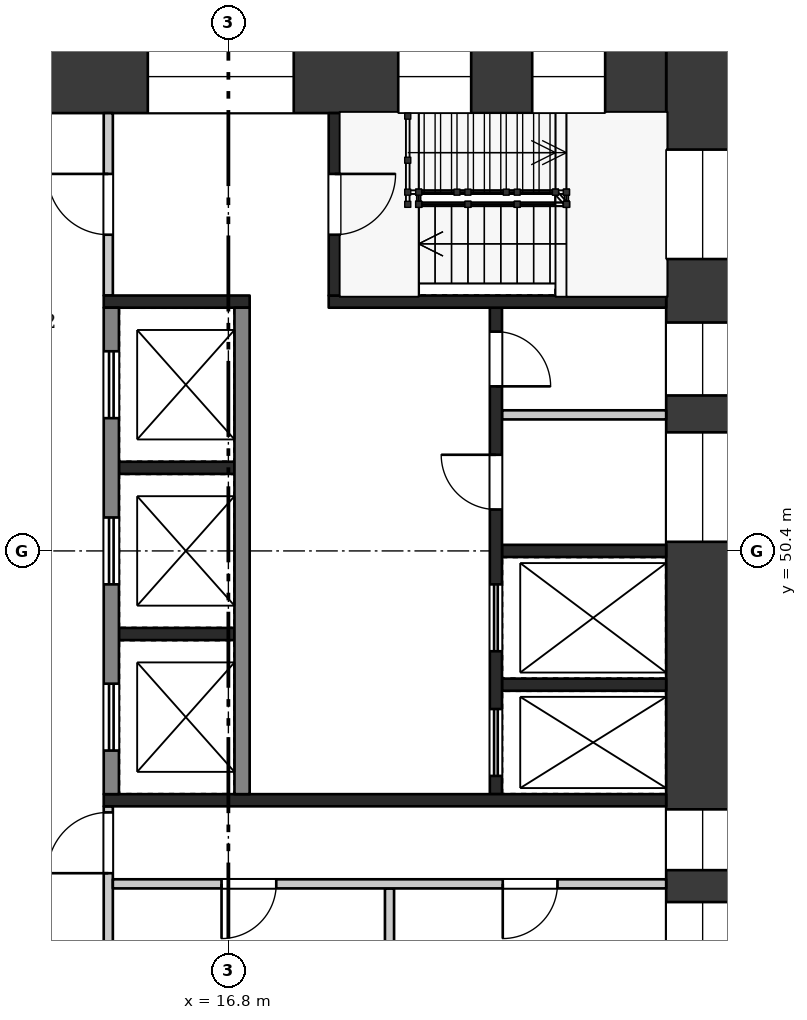
"""IFC4 building model, lengths in metres.
Left out: names, types, materials, properties, quantities, classifications, styles, units other than length and angle.
Written with IfcOpenShell. Run it as: python <this file> out.ifc"""

import sys

from ifc_helpers import new_model, si_unit, direction, frame, frame_2d, origin, origin_2d, place, context, subcontext, project, spatial, rectangle, extrude, element, fill, save


model = new_model("IFC4")
c1 = context("Model", 3, precision=1e-05, world=origin(), true_north=direction((0.0, 1.0)))
c2 = subcontext(c1, "Body", "Model", "MODEL_VIEW")
j1 = project(units=[si_unit("LENGTHUNIT", "METRE"), si_unit("PLANEANGLEUNIT", "RADIAN")], contexts=[c1])
p1 = place(None, origin())
s1 = spatial("IfcSite", under=j1, at=p1, CompositionType="ELEMENT")
p2 = place(p1, origin())
s2 = spatial("IfcBuilding", under=s1, at=p2, CompositionType="ELEMENT")
p3 = place(p2, frame((0.0, 0.0, 277.2)))
s3 = spatial("IfcBuildingStorey", under=s2, at=p3, CompositionType="ELEMENT", Elevation=277.2)
p4 = place(p3, frame((24.6, 58.8, 0.0), z_axis=(0.0, 0.0, 1.0), x_axis=(0.0, -1.0, 0.0)))
e1 = element("IfcWall", 1, at=p4, inside=s3, PredefinedType="SHEAR", context=c2, shape_type="SweptSolid", body=[
    extrude(rectangle(XDim=16.8, YDim=1.2, at=frame_2d((8.4, 0.0))), origin(), (0.0, 0.0, 1.0), 6.58),
])
p5 = place(p4, frame((1.8, 0.0, 0.5)))
e2 = element("IfcOpeningElement", 2, at=p5, cuts=e1, PredefinedType="OPENING", context=c2, shape_type="SweptSolid", body=[
    extrude(rectangle(XDim=1.8, YDim=2.4, at=frame_2d((0.9, 1.2))), frame((0.0, 0.61, 0.0), z_axis=(0.0, -1.0, 0.0), x_axis=(1.0, 0.0, 0.0)), (0.0, 0.0, 1.0), 1.22),
])
p6 = place(p4, frame((4.644, 0.0, 1.6)))
e3 = element("IfcOpeningElement", 3, at=p6, cuts=e1, PredefinedType="OPENING", context=c2, shape_type="SweptSolid", body=[
    extrude(rectangle(XDim=1.2, YDim=1.2, at=frame_2d((0.6, 0.6))), frame((0.0, 0.61, 0.0), z_axis=(0.0, -1.0, 0.0), x_axis=(1.0, 0.0, 0.0)), (0.0, 0.0, 1.0), 1.22),
])
p7 = place(p4, frame((6.45, 0.0, 1.6)))
e4 = element("IfcOpeningElement", 4, at=p7, cuts=e1, PredefinedType="OPENING", context=c2, shape_type="SweptSolid", body=[
    extrude(rectangle(XDim=1.8, YDim=1.2, at=frame_2d((0.9, 0.6))), frame((0.0, 0.61, 0.0), z_axis=(0.0, -1.0, 0.0), x_axis=(1.0, 0.0, 0.0)), (0.0, 0.0, 1.0), 1.22),
])
p8 = place(p4, frame((12.65, 0.0, 0.6)))
e5 = element("IfcOpeningElement", 5, at=p8, cuts=e1, PredefinedType="OPENING", context=c2, shape_type="SweptSolid", body=[
    extrude(rectangle(XDim=1.0, YDim=2.1, at=frame_2d((0.5, 1.05))), frame((0.0, 0.61, 0.0), z_axis=(0.0, -1.0, 0.0), x_axis=(1.0, 0.0, 0.0)), (0.0, 0.0, 1.0), 1.22),
])
p9 = place(p4, frame((14.175, 0.0, 1.6)))
e6 = element("IfcOpeningElement", 6, at=p9, cuts=e1, PredefinedType="OPENING", context=c2, shape_type="SweptSolid", body=[
    extrude(rectangle(XDim=1.2, YDim=1.2, at=frame_2d((0.6, 0.6))), frame((0.0, 0.61, 0.0), z_axis=(0.0, -1.0, 0.0), x_axis=(1.0, 0.0, 0.0)), (0.0, 0.0, 1.0), 1.22),
])
p10 = place(p3, frame((9.6, 58.2, 0.0), z_axis=(0.0, 0.0, 1.0), x_axis=(1.0, 0.0, 0.0)))
e7 = element("IfcWall", 7, at=p10, inside=s3, PredefinedType="SHEAR", context=c2, shape_type="SweptSolid", body=[
    extrude(rectangle(XDim=14.4, YDim=1.2, at=frame_2d((7.2, 0.0))), origin(), (0.0, 0.0, 1.0), 6.58),
])
p11 = place(p10, frame((1.105, 0.0, 0.6)))
e8 = element("IfcOpeningElement", 8, at=p11, cuts=e7, PredefinedType="OPENING", context=c2, shape_type="SweptSolid", body=[
    extrude(rectangle(XDim=3.0, YDim=2.1, at=frame_2d((1.5, 1.05))), frame((0.0, 0.61, 0.0), z_axis=(0.0, -1.0, 0.0), x_axis=(1.0, 0.0, 0.0)), (0.0, 0.0, 1.0), 1.22),
])
p12 = place(p10, frame((5.875, 0.0, 0.6)))
e9 = element("IfcOpeningElement", 9, at=p12, cuts=e7, PredefinedType="OPENING", context=c2, shape_type="SweptSolid", body=[
    extrude(rectangle(XDim=2.4, YDim=2.1, at=frame_2d((1.2, 1.05))), frame((0.0, 0.61, 0.0), z_axis=(0.0, -1.0, 0.0), x_axis=(1.0, 0.0, 0.0)), (0.0, 0.0, 1.0), 1.22),
])
p13 = place(p10, frame((9.993, 0.0, 0.5)))
e10 = element("IfcOpeningElement", 10, at=p13, cuts=e7, PredefinedType="OPENING", context=c2, shape_type="SweptSolid", body=[
    extrude(rectangle(XDim=1.2, YDim=2.4, at=frame_2d((0.6, 1.2))), frame((0.0, 0.61, 0.0), z_axis=(0.0, -1.0, 0.0), x_axis=(1.0, 0.0, 0.0)), (0.0, 0.0, 1.0), 1.22),
])
p14 = place(p10, frame((12.197, 0.0, 0.5)))
e11 = element("IfcOpeningElement", 11, at=p14, cuts=e7, PredefinedType="OPENING", context=c2, shape_type="SweptSolid", body=[
    extrude(rectangle(XDim=1.2, YDim=2.4, at=frame_2d((0.6, 1.2))), frame((0.0, 0.61, 0.0), z_axis=(0.0, -1.0, 0.0), x_axis=(1.0, 0.0, 0.0)), (0.0, 0.0, 1.0), 1.22),
])
for number, where, z_axis, x_axis in (
    (12, (15.0, 51.767, 0.0), (0.0, 0.0, 1.0), (1.0, 0.0, 0.0)),
    (13, (15.0, 49.033, 0.0), (0.0, 0.0, 1.0), (1.0, 0.0, 0.0)),
):
    element("IfcWall", number, at=place(p3, frame(where, z_axis=z_axis, x_axis=x_axis)), inside=s3, PredefinedType="SHEAR", context=c2, shape_type="SweptSolid", body=[
        extrude(rectangle(XDim=1.9, YDim=0.2, at=frame_2d((0.95, 0.0))), origin(), (0.0, 0.0, 1.0), 6.58),
    ])
p15 = place(p3, frame((14.875, 54.4, 0.0), z_axis=(0.0, 0.0, 1.0), x_axis=(0.0, -1.0, 0.0)))
e14 = element("IfcWall", 14, at=p15, inside=s3, PredefinedType="SHEAR", context=c2, shape_type="SweptSolid", body=[
    extrude(rectangle(XDim=8.0, YDim=0.25, at=frame_2d((4.0, 0.0))), origin(), (0.0, 0.0, 1.0), 6.58),
])
p16 = place(p15, frame((0.717, 0.0, 0.0)))
e15 = element("IfcOpeningElement", 15, at=p16, cuts=e14, PredefinedType="OPENING", context=c2, shape_type="SweptSolid", body=[
    extrude(rectangle(XDim=1.1, YDim=2.1, at=frame_2d((0.55, 1.05))), frame((0.0, 0.135, 0.0), z_axis=(0.0, -1.0, 0.0), x_axis=(1.0, 0.0, 0.0)), (0.0, 0.0, 1.0), 0.27),
])
p17 = place(p15, frame((3.45, 0.0, 0.0)))
e16 = element("IfcOpeningElement", 16, at=p17, cuts=e14, PredefinedType="OPENING", context=c2, shape_type="SweptSolid", body=[
    extrude(rectangle(XDim=1.1, YDim=2.1, at=frame_2d((0.55, 1.05))), frame((0.0, 0.135, 0.0), z_axis=(0.0, -1.0, 0.0), x_axis=(1.0, 0.0, 0.0)), (0.0, 0.0, 1.0), 0.27),
])
p18 = place(p15, frame((6.183, 0.0, 0.0)))
e17 = element("IfcOpeningElement", 17, at=p18, cuts=e14, PredefinedType="OPENING", context=c2, shape_type="SweptSolid", body=[
    extrude(rectangle(XDim=1.1, YDim=2.1, at=frame_2d((0.55, 1.05))), frame((0.0, 0.135, 0.0), z_axis=(0.0, -1.0, 0.0), x_axis=(1.0, 0.0, 0.0)), (0.0, 0.0, 1.0), 0.27),
])
p19 = place(p3, frame((17.025, 54.4, 0.0), z_axis=(0.0, 0.0, 1.0), x_axis=(0.0, -1.0, 0.0)))
e18 = element("IfcWall", 18, at=p19, inside=s3, PredefinedType="SHEAR", context=c2, shape_type="SweptSolid", body=[
    extrude(rectangle(XDim=8.0, YDim=0.25, at=frame_2d((4.0, 0.0))), origin(), (0.0, 0.0, 1.0), 6.58),
])
for number, where, z_axis, x_axis in (
    (19, (21.3, 50.4, 0.0), (0.0, 0.0, 1.0), (1.0, 0.0, 0.0)),
    (20, (21.3, 48.2, 0.0), (0.0, 0.0, 1.0), (1.0, 0.0, 0.0)),
):
    element("IfcWall", number, at=place(p3, frame(where, z_axis=z_axis, x_axis=x_axis)), inside=s3, PredefinedType="SHEAR", context=c2, shape_type="SweptSolid", body=[
        extrude(rectangle(XDim=2.7, YDim=0.2, at=frame_2d((1.35, 0.0))), origin(), (0.0, 0.0, 1.0), 6.58),
    ])
p20 = place(p3, frame((21.3, 52.637, 0.0), z_axis=(0.0, 0.0, 1.0), x_axis=(1.0, 0.0, 0.0)))
e21 = element("IfcWall", 21, at=p20, inside=s3, PredefinedType="PARTITIONING", context=c2, shape_type="SweptSolid", body=[
    extrude(rectangle(XDim=2.7, YDim=0.15, at=frame_2d((1.35, 0.0))), origin(), (0.0, 0.0, 1.0), 6.58),
])
p21 = place(p3, frame((21.2, 54.4, 0.0), z_axis=(0.0, 0.0, 1.0), x_axis=(0.0, -1.0, 0.0)))
e22 = element("IfcWall", 22, at=p21, inside=s3, PredefinedType="SHEAR", context=c2, shape_type="SweptSolid", body=[
    extrude(rectangle(XDim=8.0, YDim=0.2, at=frame_2d((4.0, 0.0))), origin(), (0.0, 0.0, 1.0), 6.58),
])
p22 = place(p21, frame((0.394, 0.0, 0.0)))
e23 = element("IfcOpeningElement", 23, at=p22, cuts=e22, PredefinedType="OPENING", context=c2, shape_type="SweptSolid", body=[
    extrude(rectangle(XDim=0.9, YDim=2.1, at=frame_2d((0.45, 1.05))), frame((0.0, 0.11, 0.0), z_axis=(0.0, -1.0, 0.0), x_axis=(1.0, 0.0, 0.0)), (0.0, 0.0, 1.0), 0.22),
])
p23 = place(p21, frame((2.419, 0.0, 0.0)))
e24 = element("IfcOpeningElement", 24, at=p23, cuts=e22, PredefinedType="OPENING", context=c2, shape_type="SweptSolid", body=[
    extrude(rectangle(XDim=0.9, YDim=2.1, at=frame_2d((0.45, 1.05))), frame((0.0, 0.11, 0.0), z_axis=(0.0, -1.0, 0.0), x_axis=(1.0, 0.0, 0.0)), (0.0, 0.0, 1.0), 0.22),
])
p24 = place(p21, frame((4.55, 0.0, 0.0)))
e25 = element("IfcOpeningElement", 25, at=p24, cuts=e22, PredefinedType="OPENING", context=c2, shape_type="SweptSolid", body=[
    extrude(rectangle(XDim=1.1, YDim=2.1, at=frame_2d((0.55, 1.05))), frame((0.0, 0.11, 0.0), z_axis=(0.0, -1.0, 0.0), x_axis=(1.0, 0.0, 0.0)), (0.0, 0.0, 1.0), 0.22),
])
p25 = place(p21, frame((6.6, 0.0, 0.0)))
e26 = element("IfcOpeningElement", 26, at=p25, cuts=e22, PredefinedType="OPENING", context=c2, shape_type="SweptSolid", body=[
    extrude(rectangle(XDim=1.1, YDim=2.1, at=frame_2d((0.55, 1.05))), frame((0.0, 0.11, 0.0), z_axis=(0.0, -1.0, 0.0), x_axis=(1.0, 0.0, 0.0)), (0.0, 0.0, 1.0), 0.22),
])
p26 = place(p3, frame((14.75, 54.5, 0.0), z_axis=(0.0, 0.0, 1.0), x_axis=(1.0, 0.0, 0.0)))
e27 = element("IfcWall", 27, at=p26, inside=s3, PredefinedType="SHEAR", context=c2, shape_type="SweptSolid", body=[
    extrude(rectangle(XDim=2.4, YDim=0.2, at=frame_2d((1.2, 0.0))), origin(), (0.0, 0.0, 1.0), 6.58),
])
p27 = place(p3, frame((18.45, 54.5, 0.0), z_axis=(0.0, 0.0, 1.0), x_axis=(1.0, 0.0, 0.0)))
e28 = element("IfcWall", 28, at=p27, inside=s3, PredefinedType="SHEAR", context=c2, shape_type="SweptSolid", body=[
    extrude(rectangle(XDim=5.55, YDim=0.2, at=frame_2d((2.775, 0.0))), origin(), (0.0, 0.0, 1.0), 6.58),
])
p28 = place(p3, frame((14.825, 57.6, 0.0), z_axis=(0.0, 0.0, 1.0), x_axis=(0.0, -1.0, 0.0)))
e29 = element("IfcWall", 29, at=p28, inside=s3, PredefinedType="PARTITIONING", context=c2, shape_type="SweptSolid", body=[
    extrude(rectangle(XDim=3.0, YDim=0.15, at=frame_2d((1.5, 0.0))), origin(), (0.0, 0.0, 1.0), 6.58),
])
p29 = place(p28, frame((1.0, 0.0, 0.0)))
e30 = element("IfcOpeningElement", 30, at=p29, cuts=e29, PredefinedType="OPENING", context=c2, shape_type="SweptSolid", body=[
    extrude(rectangle(XDim=1.0, YDim=2.1, at=frame_2d((0.5, 1.05))), frame((0.0, 0.085, 0.0), z_axis=(0.0, -1.0, 0.0), x_axis=(1.0, 0.0, 0.0)), (0.0, 0.0, 1.0), 0.17),
])
p30 = place(p3, frame((18.55, 57.6, 0.0), z_axis=(0.0, 0.0, 1.0), x_axis=(0.0, -1.0, 0.0)))
e31 = element("IfcWall", 31, at=p30, inside=s3, PredefinedType="SHEAR", context=c2, shape_type="SweptSolid", body=[
    extrude(rectangle(XDim=3.0, YDim=0.2, at=frame_2d((1.5, 0.0))), origin(), (0.0, 0.0, 1.0), 6.58),
])
p31 = place(p30, frame((1.0, 0.0, 0.0)))
e32 = element("IfcOpeningElement", 32, at=p31, cuts=e31, PredefinedType="OPENING", context=c2, shape_type="SweptSolid", body=[
    extrude(rectangle(XDim=1.0, YDim=2.1, at=frame_2d((0.5, 1.05))), frame((0.0, 0.11, 0.0), z_axis=(0.0, -1.0, 0.0), x_axis=(1.0, 0.0, 0.0)), (0.0, 0.0, 1.0), 0.22),
])
p32 = place(p3, frame((14.75, 46.3, 0.0), z_axis=(0.0, 0.0, 1.0), x_axis=(1.0, 0.0, 0.0)))
e33 = element("IfcWall", 33, at=p32, inside=s3, PredefinedType="SHEAR", context=c2, shape_type="SweptSolid", body=[
    extrude(rectangle(XDim=9.25, YDim=0.2, at=frame_2d((4.625, 0.0))), origin(), (0.0, 0.0, 1.0), 6.58),
])
p33 = place(p3, frame((14.825, 46.2, 0.0), z_axis=(0.0, 0.0, 1.0), x_axis=(0.0, -1.0, 0.0)))
e34 = element("IfcWall", 34, at=p33, inside=s3, PredefinedType="PARTITIONING", context=c2, shape_type="SweptSolid", body=[
    extrude(rectangle(XDim=3.0, YDim=0.15, at=frame_2d((1.5, 0.0))), origin(), (0.0, 0.0, 1.0), 6.58),
])
p34 = place(p33, frame((0.1, 0.0, 0.0)))
e35 = element("IfcOpeningElement", 35, at=p34, cuts=e34, PredefinedType="OPENING", context=c2, shape_type="SweptSolid", body=[
    extrude(rectangle(XDim=1.0, YDim=2.1, at=frame_2d((0.5, 1.05))), frame((0.0, 0.085, 0.0), z_axis=(0.0, -1.0, 0.0), x_axis=(1.0, 0.0, 0.0)), (0.0, 0.0, 1.0), 0.17),
])
p35 = place(p3, frame((19.45, 44.85, 0.0), z_axis=(0.0, 0.0, 1.0), x_axis=(0.0, -1.0, 0.0)))
e36 = element("IfcWall", 36, at=p35, inside=s3, PredefinedType="PARTITIONING", context=c2, shape_type="SweptSolid", body=[
    extrude(rectangle(XDim=1.65, YDim=0.15, at=frame_2d((0.825, 0.0))), origin(), (0.0, 0.0, 1.0), 6.58),
])
p36 = place(p3, frame((14.9, 44.925, 0.0), z_axis=(0.0, 0.0, 1.0), x_axis=(1.0, 0.0, 0.0)))
e37 = element("IfcWall", 37, at=p36, inside=s3, PredefinedType="PARTITIONING", context=c2, shape_type="SweptSolid", body=[
    extrude(rectangle(XDim=9.1, YDim=0.15, at=frame_2d((4.55, 0.0))), origin(), (0.0, 0.0, 1.0), 6.58),
])
p37 = place(p36, frame((1.788, 0.0, 0.0)))
e38 = element("IfcOpeningElement", 38, at=p37, cuts=e37, PredefinedType="OPENING", context=c2, shape_type="SweptSolid", body=[
    extrude(rectangle(XDim=0.9, YDim=2.1, at=frame_2d((0.45, 1.05))), frame((0.0, 0.085, 0.0), z_axis=(0.0, -1.0, 0.0), x_axis=(1.0, 0.0, 0.0)), (0.0, 0.0, 1.0), 0.17),
])
p38 = place(p36, frame((6.413, 0.0, 0.0)))
e39 = element("IfcOpeningElement", 39, at=p38, cuts=e37, PredefinedType="OPENING", context=c2, shape_type="SweptSolid", body=[
    extrude(rectangle(XDim=0.9, YDim=2.1, at=frame_2d((0.45, 1.05))), frame((0.0, 0.085, 0.0), z_axis=(0.0, -1.0, 0.0), x_axis=(1.0, 0.0, 0.0)), (0.0, 0.0, 1.0), 0.17),
])
p39 = place(p16, origin())
e40 = element("IfcDoor", 40, at=p39, inside=s3, OperationType="DOUBLE_DOOR_SLIDING", PredefinedType="DOOR", context=c2, shape_type="SweptSolid", body=[
    extrude(rectangle(XDim=1.1, YDim=2.1, at=frame_2d((0.55, 1.05))), frame((0.0, 0.025, 0.0), z_axis=(0.0, -1.0, 0.0), x_axis=(1.0, 0.0, 0.0)), (0.0, 0.0, 1.0), 0.05),
])
fill(e15, e40)
p40 = place(p17, origin())
e41 = element("IfcDoor", 41, at=p40, inside=s3, OperationType="DOUBLE_DOOR_SLIDING", PredefinedType="DOOR", context=c2, shape_type="SweptSolid", body=[
    extrude(rectangle(XDim=1.1, YDim=2.1, at=frame_2d((0.55, 1.05))), frame((0.0, 0.025, 0.0), z_axis=(0.0, -1.0, 0.0), x_axis=(1.0, 0.0, 0.0)), (0.0, 0.0, 1.0), 0.05),
])
fill(e16, e41)
p41 = place(p18, origin())
e42 = element("IfcDoor", 42, at=p41, inside=s3, OperationType="DOUBLE_DOOR_SLIDING", PredefinedType="DOOR", context=c2, shape_type="SweptSolid", body=[
    extrude(rectangle(XDim=1.1, YDim=2.1, at=frame_2d((0.55, 1.05))), frame((0.0, 0.025, 0.0), z_axis=(0.0, -1.0, 0.0), x_axis=(1.0, 0.0, 0.0)), (0.0, 0.0, 1.0), 0.05),
])
fill(e17, e42)
p42 = place(p22, origin())
e43 = element("IfcDoor", 43, at=p42, inside=s3, OperationType="SINGLE_SWING_RIGHT", PredefinedType="DOOR", context=c2, shape_type="SweptSolid", body=[
    extrude(rectangle(XDim=0.9, YDim=2.1, at=frame_2d((0.45, 1.05))), frame((0.0, 0.025, 0.0), z_axis=(0.0, -1.0, 0.0), x_axis=(1.0, 0.0, 0.0)), (0.0, 0.0, 1.0), 0.05),
])
fill(e23, e43)
p43 = place(p23, frame((0.9, 0.0, 0.0), z_axis=(0.0, 0.0, 1.0), x_axis=(-1.0, 0.0, 0.0)))
e44 = element("IfcDoor", 44, at=p43, inside=s3, OperationType="SINGLE_SWING_RIGHT", PredefinedType="DOOR", context=c2, shape_type="SweptSolid", body=[
    extrude(rectangle(XDim=0.9, YDim=2.1, at=frame_2d((0.45, 1.05))), frame((0.0, 0.025, 0.0), z_axis=(0.0, -1.0, 0.0), x_axis=(1.0, 0.0, 0.0)), (0.0, 0.0, 1.0), 0.05),
])
fill(e24, e44)
p44 = place(p24, origin())
e45 = element("IfcDoor", 45, at=p44, inside=s3, OperationType="DOUBLE_DOOR_SLIDING", PredefinedType="DOOR", context=c2, shape_type="SweptSolid", body=[
    extrude(rectangle(XDim=1.1, YDim=2.1, at=frame_2d((0.55, 1.05))), frame((0.0, 0.025, 0.0), z_axis=(0.0, -1.0, 0.0), x_axis=(1.0, 0.0, 0.0)), (0.0, 0.0, 1.0), 0.05),
])
fill(e25, e45)
p45 = place(p25, origin())
e46 = element("IfcDoor", 46, at=p45, inside=s3, OperationType="DOUBLE_DOOR_SLIDING", PredefinedType="DOOR", context=c2, shape_type="SweptSolid", body=[
    extrude(rectangle(XDim=1.1, YDim=2.1, at=frame_2d((0.55, 1.05))), frame((0.0, 0.025, 0.0), z_axis=(0.0, -1.0, 0.0), x_axis=(1.0, 0.0, 0.0)), (0.0, 0.0, 1.0), 0.05),
])
fill(e26, e46)
p46 = place(p29, frame((1.0, 0.0, 0.0), z_axis=(0.0, 0.0, 1.0), x_axis=(-1.0, 0.0, 0.0)))
e47 = element("IfcDoor", 47, at=p46, inside=s3, OperationType="SINGLE_SWING_RIGHT", PredefinedType="DOOR", context=c2, shape_type="SweptSolid", body=[
    extrude(rectangle(XDim=1.0, YDim=2.1, at=frame_2d((0.5, 1.05))), frame((0.0, 0.025, 0.0), z_axis=(0.0, -1.0, 0.0), x_axis=(1.0, 0.0, 0.0)), (0.0, 0.0, 1.0), 0.05),
])
fill(e30, e47)
p47 = place(p31, origin())
e48 = element("IfcDoor", 48, at=p47, inside=s3, OperationType="SINGLE_SWING_LEFT", PredefinedType="DOOR", context=c2, shape_type="SweptSolid", body=[
    extrude(rectangle(XDim=1.0, YDim=2.1, at=frame_2d((0.5, 1.05))), frame((0.0, 0.025, 0.0), z_axis=(0.0, -1.0, 0.0), x_axis=(1.0, 0.0, 0.0)), (0.0, 0.0, 1.0), 0.05),
])
fill(e32, e48)
p48 = place(p34, frame((1.0, 0.0, 0.0), z_axis=(0.0, 0.0, 1.0), x_axis=(-1.0, 0.0, 0.0)))
e49 = element("IfcDoor", 49, at=p48, inside=s3, OperationType="SINGLE_SWING_LEFT", PredefinedType="DOOR", context=c2, shape_type="SweptSolid", body=[
    extrude(rectangle(XDim=1.0, YDim=2.1, at=frame_2d((0.5, 1.05))), frame((0.0, 0.025, 0.0), z_axis=(0.0, -1.0, 0.0), x_axis=(1.0, 0.0, 0.0)), (0.0, 0.0, 1.0), 0.05),
])
fill(e35, e49)
p49 = place(p37, frame((0.9, 0.0, 0.0), z_axis=(0.0, 0.0, 1.0), x_axis=(-1.0, 0.0, 0.0)))
e50 = element("IfcDoor", 50, at=p49, inside=s3, OperationType="SINGLE_SWING_RIGHT", PredefinedType="DOOR", context=c2, shape_type="SweptSolid", body=[
    extrude(rectangle(XDim=0.9, YDim=2.1, at=frame_2d((0.45, 1.05))), frame((0.0, 0.025, 0.0), z_axis=(0.0, -1.0, 0.0), x_axis=(1.0, 0.0, 0.0)), (0.0, 0.0, 1.0), 0.05),
])
fill(e38, e50)
p50 = place(p38, frame((0.9, 0.0, 0.0), z_axis=(0.0, 0.0, 1.0), x_axis=(-1.0, 0.0, 0.0)))
e51 = element("IfcDoor", 51, at=p50, inside=s3, OperationType="SINGLE_SWING_RIGHT", PredefinedType="DOOR", context=c2, shape_type="SweptSolid", body=[
    extrude(rectangle(XDim=0.9, YDim=2.1, at=frame_2d((0.45, 1.05))), frame((0.0, 0.025, 0.0), z_axis=(0.0, -1.0, 0.0), x_axis=(1.0, 0.0, 0.0)), (0.0, 0.0, 1.0), 0.05),
])
fill(e39, e51)
p51 = place(p5, origin())
e52 = element("IfcWindow", 52, at=p51, inside=s3, PartitioningType="SINGLE_PANEL", PredefinedType="WINDOW", context=c2, shape_type="SweptSolid", body=[
    extrude(rectangle(XDim=1.8, YDim=2.4, at=frame_2d((0.9, 1.2))), frame((0.0, 0.03, 0.0), z_axis=(0.0, -1.0, 0.0), x_axis=(1.0, 0.0, 0.0)), (0.0, 0.0, 1.0), 0.06),
])
fill(e2, e52)
p52 = place(p6, origin())
e53 = element("IfcWindow", 53, at=p52, inside=s3, PartitioningType="SINGLE_PANEL", PredefinedType="WINDOW", context=c2, shape_type="SweptSolid", body=[
    extrude(rectangle(XDim=1.2, YDim=1.2, at=frame_2d((0.6, 0.6))), frame((0.0, 0.03, 0.0), z_axis=(0.0, -1.0, 0.0), x_axis=(1.0, 0.0, 0.0)), (0.0, 0.0, 1.0), 0.06),
])
fill(e3, e53)
p53 = place(p7, origin())
e54 = element("IfcWindow", 54, at=p53, inside=s3, PartitioningType="SINGLE_PANEL", PredefinedType="WINDOW", context=c2, shape_type="SweptSolid", body=[
    extrude(rectangle(XDim=1.8, YDim=1.2, at=frame_2d((0.9, 0.6))), frame((0.0, 0.03, 0.0), z_axis=(0.0, -1.0, 0.0), x_axis=(1.0, 0.0, 0.0)), (0.0, 0.0, 1.0), 0.06),
])
fill(e4, e54)
p54 = place(p8, origin())
e55 = element("IfcWindow", 55, at=p54, inside=s3, PartitioningType="SINGLE_PANEL", PredefinedType="WINDOW", context=c2, shape_type="SweptSolid", body=[
    extrude(rectangle(XDim=1.0, YDim=2.1, at=frame_2d((0.5, 1.05))), frame((0.0, 0.03, 0.0), z_axis=(0.0, -1.0, 0.0), x_axis=(1.0, 0.0, 0.0)), (0.0, 0.0, 1.0), 0.06),
])
fill(e5, e55)
p55 = place(p9, origin())
e56 = element("IfcWindow", 56, at=p55, inside=s3, PartitioningType="SINGLE_PANEL", PredefinedType="WINDOW", context=c2, shape_type="SweptSolid", body=[
    extrude(rectangle(XDim=1.2, YDim=1.2, at=frame_2d((0.6, 0.6))), frame((0.0, 0.03, 0.0), z_axis=(0.0, -1.0, 0.0), x_axis=(1.0, 0.0, 0.0)), (0.0, 0.0, 1.0), 0.06),
])
fill(e6, e56)
p56 = place(p12, origin())
e57 = element("IfcWindow", 57, at=p56, inside=s3, PartitioningType="SINGLE_PANEL", PredefinedType="WINDOW", context=c2, shape_type="SweptSolid", body=[
    extrude(rectangle(XDim=2.4, YDim=2.1, at=frame_2d((1.2, 1.05))), frame((0.0, 0.03, 0.0), z_axis=(0.0, -1.0, 0.0), x_axis=(1.0, 0.0, 0.0)), (0.0, 0.0, 1.0), 0.06),
])
fill(e9, e57)
p57 = place(p13, origin())
e58 = element("IfcWindow", 58, at=p57, inside=s3, PartitioningType="SINGLE_PANEL", PredefinedType="WINDOW", context=c2, shape_type="SweptSolid", body=[
    extrude(rectangle(XDim=1.2, YDim=2.4, at=frame_2d((0.6, 1.2))), frame((0.0, 0.03, 0.0), z_axis=(0.0, -1.0, 0.0), x_axis=(1.0, 0.0, 0.0)), (0.0, 0.0, 1.0), 0.06),
])
fill(e10, e58)
p58 = place(p14, origin())
e59 = element("IfcWindow", 59, at=p58, inside=s3, PartitioningType="SINGLE_PANEL", PredefinedType="WINDOW", context=c2, shape_type="SweptSolid", body=[
    extrude(rectangle(XDim=1.2, YDim=2.4, at=frame_2d((0.6, 1.2))), frame((0.0, 0.03, 0.0), z_axis=(0.0, -1.0, 0.0), x_axis=(1.0, 0.0, 0.0)), (0.0, 0.0, 1.0), 0.06),
])
fill(e11, e59)
p59 = place(p2, frame((0.0, 0.0, 287.45)))
p60 = place(p59, frame((0.0, 0.0, -0.25)))
p61 = place(p60, frame((15.95, 50.4, 0.0)))
p62 = place(p61, frame((0.0, 0.0, 0.2)))
e60 = element("IfcWindow", 60, at=p62, inside=s3, PartitioningType="SINGLE_PANEL", PredefinedType="SKYLIGHT", context=c2, shape_type="SweptSolid", body=[
    extrude(rectangle(XDim=0.9, YDim=0.9, at=origin_2d()), origin(), (0.0, 0.0, 1.0), 0.05),
])
p63 = place(p59, frame((0.0, 0.0, 1.95)))
p64 = place(p63, frame((22.65, 47.25, 0.0)))
p65 = place(p64, frame((0.0, 0.0, 0.2)))
e61 = element("IfcWindow", 61, at=p65, inside=s3, PartitioningType="SINGLE_PANEL", PredefinedType="SKYLIGHT", context=c2, shape_type="SweptSolid", body=[
    extrude(rectangle(XDim=0.9, YDim=0.9, at=origin_2d()), origin(), (0.0, 0.0, 1.0), 0.05),
])
save(model, sys.argv[1])
